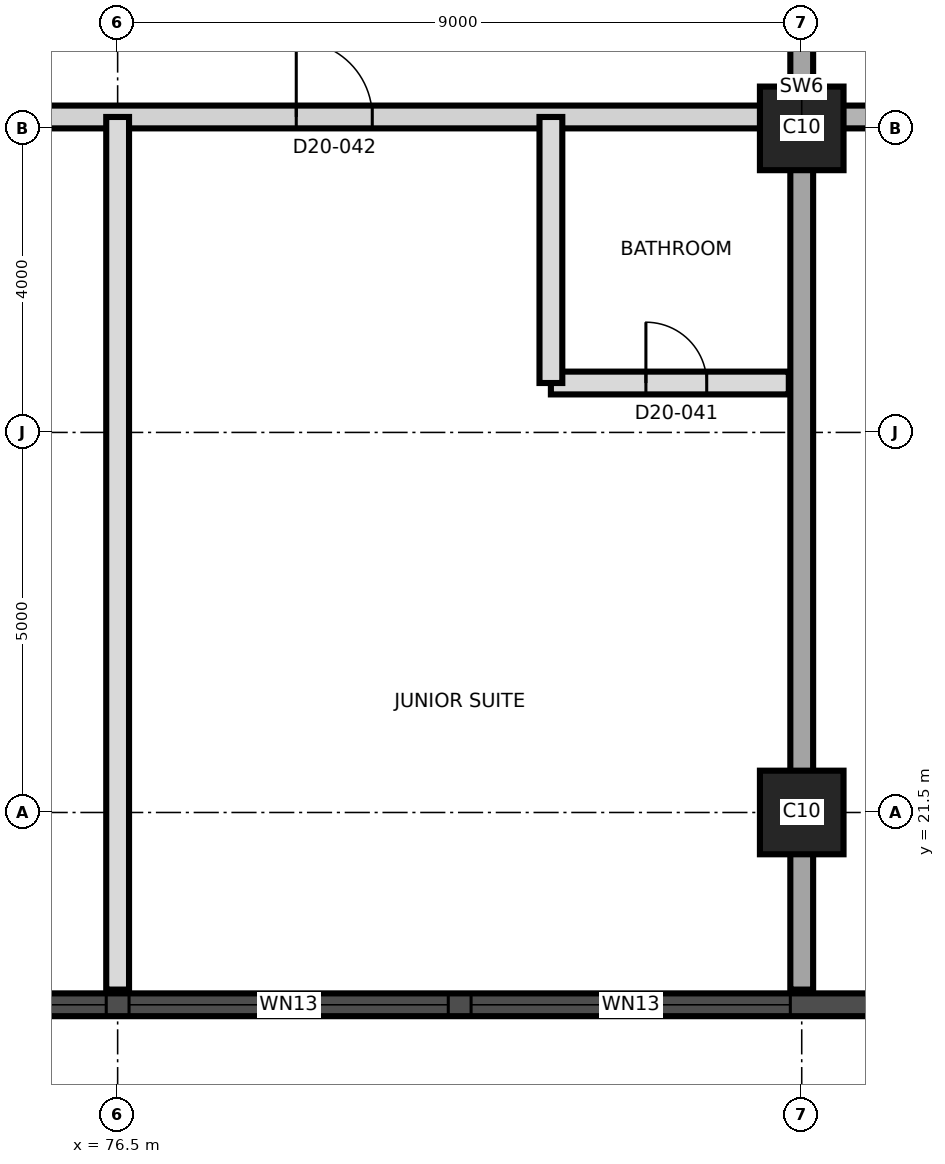
"""IFC4 building model, lengths in metres.
Left out: names, types, materials, properties, quantities, classifications, styles, units other than length and angle.
Written with IfcOpenShell. Run it as: python <this file> out.ifc"""

import sys

from ifc_helpers import new_model, si_unit, direction, frame, frame_2d, origin, origin_2d, place, context, subcontext, project, spatial, rectangle, extrude, element, fill, save


model = new_model("IFC4")
c1 = context("Model", 3, precision=1e-05, world=origin(), true_north=direction((0.0, 1.0)))
c2 = subcontext(c1, "Body", "Model", "MODEL_VIEW")
j1 = project(units=[si_unit("LENGTHUNIT", "METRE"), si_unit("PLANEANGLEUNIT", "RADIAN")], contexts=[c1])
p1 = place(None, origin())
s1 = spatial("IfcSite", under=j1, at=p1, CompositionType="ELEMENT")
p2 = place(p1, origin())
s2 = spatial("IfcBuilding", under=s1, at=p2, CompositionType="ELEMENT")
p3 = place(p2, frame((0.0, 0.0, 182.9)))
s3 = spatial("IfcBuildingStorey", under=s2, at=p3, CompositionType="ELEMENT", Elevation=182.9)
for number, where, z_axis, x_axis in (
    (1, (85.5, 21.5, 0.0), (0.0, 0.0, 1.0), (1.0, 0.0, 0.0)),
    (2, (85.5, 30.5, 0.0), (0.0, 0.0, 1.0), (1.0, 0.0, 0.0)),
):
    element("IfcColumn", number, at=place(p3, frame(where, z_axis=z_axis, x_axis=x_axis)), inside=s3, PredefinedType="COLUMN", context=c2, shape_type="SweptSolid", body=[
        extrude(rectangle(XDim=1.1, YDim=1.1, at=origin_2d()), origin(), (0.0, 0.0, 1.0), 3.7),
    ])
p4 = place(p3, frame((85.5, 19.17, 0.0), z_axis=(0.0, 0.0, 1.0), x_axis=(0.0, 1.0, 0.0)))
e3 = element("IfcWall", 3, at=p4, inside=s3, PredefinedType="SHEAR", context=c2, shape_type="SweptSolid", body=[
    extrude(rectangle(XDim=22.66, YDim=0.3, at=frame_2d((11.33, 0.0))), origin(), (0.0, 0.0, 1.0), 3.7),
])
p5 = place(p4, frame((12.53, 0.0, 0.0)))
e4 = element("IfcOpeningElement", 4, at=p5, cuts=e3, PredefinedType="OPENING", context=c2, shape_type="SweptSolid", body=[
    extrude(rectangle(XDim=1.4, YDim=2.1, at=frame_2d((0.7, 1.05))), frame((0.0, 0.16, 0.0), z_axis=(0.0, -1.0, 0.0), x_axis=(1.0, 0.0, 0.0)), (0.0, 0.0, 1.0), 0.32),
])
p6 = place(p3, frame((44.01, 18.97, 0.0), z_axis=(0.0, 0.0, 1.0), x_axis=(1.0, 0.0, 0.0)))
e5 = element("IfcWall", 5, at=p6, inside=s3, PredefinedType="SOLIDWALL", context=c2, shape_type="SweptSolid", body=[
    extrude(rectangle(XDim=43.478, YDim=0.3, at=frame_2d((21.739, 0.0))), origin(), (0.0, 0.0, 1.0), 3.4),
])
p7 = place(p6, frame((1.845, 0.0, 0.3)))
e6 = element("IfcOpeningElement", 6, at=p7, cuts=e5, PredefinedType="OPENING", context=c2, shape_type="SweptSolid", body=[
    extrude(rectangle(XDim=1.8, YDim=2.4, at=frame_2d((0.9, 1.2))), frame((0.0, 0.16, 0.0), z_axis=(0.0, -1.0, 0.0), x_axis=(1.0, 0.0, 0.0)), (0.0, 0.0, 1.0), 0.32),
])
p8 = place(p6, frame((5.64, 0.0, 0.9)))
e7 = element("IfcOpeningElement", 7, at=p8, cuts=e5, PredefinedType="OPENING", context=c2, shape_type="SweptSolid", body=[
    extrude(rectangle(XDim=4.2, YDim=1.7, at=frame_2d((2.1, 0.85))), frame((0.0, 0.16, 0.0), z_axis=(0.0, -1.0, 0.0), x_axis=(1.0, 0.0, 0.0)), (0.0, 0.0, 1.0), 0.32),
])
p9 = place(p6, frame((10.14, 0.0, 0.9)))
e8 = element("IfcOpeningElement", 8, at=p9, cuts=e5, PredefinedType="OPENING", context=c2, shape_type="SweptSolid", body=[
    extrude(rectangle(XDim=4.2, YDim=1.7, at=frame_2d((2.1, 0.85))), frame((0.0, 0.16, 0.0), z_axis=(0.0, -1.0, 0.0), x_axis=(1.0, 0.0, 0.0)), (0.0, 0.0, 1.0), 0.32),
])
p10 = place(p6, frame((14.64, 0.0, 0.9)))
e9 = element("IfcOpeningElement", 9, at=p10, cuts=e5, PredefinedType="OPENING", context=c2, shape_type="SweptSolid", body=[
    extrude(rectangle(XDim=4.2, YDim=1.7, at=frame_2d((2.1, 0.85))), frame((0.0, 0.16, 0.0), z_axis=(0.0, -1.0, 0.0), x_axis=(1.0, 0.0, 0.0)), (0.0, 0.0, 1.0), 0.32),
])
p11 = place(p6, frame((19.14, 0.0, 0.9)))
e10 = element("IfcOpeningElement", 10, at=p11, cuts=e5, PredefinedType="OPENING", context=c2, shape_type="SweptSolid", body=[
    extrude(rectangle(XDim=4.2, YDim=1.7, at=frame_2d((2.1, 0.85))), frame((0.0, 0.16, 0.0), z_axis=(0.0, -1.0, 0.0), x_axis=(1.0, 0.0, 0.0)), (0.0, 0.0, 1.0), 0.32),
])
p12 = place(p6, frame((23.64, 0.0, 0.9)))
e11 = element("IfcOpeningElement", 11, at=p12, cuts=e5, PredefinedType="OPENING", context=c2, shape_type="SweptSolid", body=[
    extrude(rectangle(XDim=4.2, YDim=1.7, at=frame_2d((2.1, 0.85))), frame((0.0, 0.16, 0.0), z_axis=(0.0, -1.0, 0.0), x_axis=(1.0, 0.0, 0.0)), (0.0, 0.0, 1.0), 0.32),
])
p13 = place(p6, frame((28.14, 0.0, 0.9)))
e12 = element("IfcOpeningElement", 12, at=p13, cuts=e5, PredefinedType="OPENING", context=c2, shape_type="SweptSolid", body=[
    extrude(rectangle(XDim=4.2, YDim=1.7, at=frame_2d((2.1, 0.85))), frame((0.0, 0.16, 0.0), z_axis=(0.0, -1.0, 0.0), x_axis=(1.0, 0.0, 0.0)), (0.0, 0.0, 1.0), 0.32),
])
p14 = place(p6, frame((32.64, 0.0, 0.9)))
e13 = element("IfcOpeningElement", 13, at=p14, cuts=e5, PredefinedType="OPENING", context=c2, shape_type="SweptSolid", body=[
    extrude(rectangle(XDim=4.2, YDim=1.7, at=frame_2d((2.1, 0.85))), frame((0.0, 0.16, 0.0), z_axis=(0.0, -1.0, 0.0), x_axis=(1.0, 0.0, 0.0)), (0.0, 0.0, 1.0), 0.32),
])
p15 = place(p6, frame((37.14, 0.0, 0.9)))
e14 = element("IfcOpeningElement", 14, at=p15, cuts=e5, PredefinedType="OPENING", context=c2, shape_type="SweptSolid", body=[
    extrude(rectangle(XDim=4.2, YDim=1.7, at=frame_2d((2.1, 0.85))), frame((0.0, 0.16, 0.0), z_axis=(0.0, -1.0, 0.0), x_axis=(1.0, 0.0, 0.0)), (0.0, 0.0, 1.0), 0.32),
])
p16 = place(p3, frame((82.2, 27.15, 0.0), z_axis=(0.0, 0.0, 1.0), x_axis=(1.0, 0.0, 0.0)))
e15 = element("IfcWall", 15, at=p16, inside=s3, PredefinedType="PARTITIONING", context=c2, shape_type="SweptSolid", body=[
    extrude(rectangle(XDim=3.13, YDim=0.3, at=frame_2d((1.565, 0.0))), origin(), (0.0, 0.0, 1.0), 3.4),
])
p17 = place(p16, frame((1.25, 0.0, 0.0)))
e16 = element("IfcOpeningElement", 16, at=p17, cuts=e15, PredefinedType="OPENING", context=c2, shape_type="SweptSolid", body=[
    extrude(rectangle(XDim=0.8, YDim=2.1, at=frame_2d((0.4, 1.05))), frame((0.0, 0.16, 0.0), z_axis=(0.0, -1.0, 0.0), x_axis=(1.0, 0.0, 0.0)), (0.0, 0.0, 1.0), 0.32),
])
p18 = place(p3, frame((58.65, 30.65, 0.0), z_axis=(0.0, 0.0, 1.0), x_axis=(1.0, 0.0, 0.0)))
e17 = element("IfcWall", 17, at=p18, inside=s3, PredefinedType="PARTITIONING", context=c2, shape_type="SweptSolid", body=[
    extrude(rectangle(XDim=26.68, YDim=0.3, at=frame_2d((13.34, 0.0))), origin(), (0.0, 0.0, 1.0), 3.4),
])
p19 = place(p18, frame((2.9, 0.0, 0.0)))
e18 = element("IfcOpeningElement", 18, at=p19, cuts=e17, PredefinedType="OPENING", context=c2, shape_type="SweptSolid", body=[
    extrude(rectangle(XDim=1.0, YDim=2.1, at=frame_2d((0.5, 1.05))), frame((0.0, 0.16, 0.0), z_axis=(0.0, -1.0, 0.0), x_axis=(1.0, 0.0, 0.0)), (0.0, 0.0, 1.0), 0.32),
])
p20 = place(p18, frame((5.85, 0.0, 0.0)))
e19 = element("IfcOpeningElement", 19, at=p20, cuts=e17, PredefinedType="OPENING", context=c2, shape_type="SweptSolid", body=[
    extrude(rectangle(XDim=1.4, YDim=2.1, at=frame_2d((0.7, 1.05))), frame((0.0, 0.16, 0.0), z_axis=(0.0, -1.0, 0.0), x_axis=(1.0, 0.0, 0.0)), (0.0, 0.0, 1.0), 0.32),
])
p21 = place(p18, frame((10.0, 0.0, 0.0)))
e20 = element("IfcOpeningElement", 20, at=p21, cuts=e17, PredefinedType="OPENING", context=c2, shape_type="SweptSolid", body=[
    extrude(rectangle(XDim=1.0, YDim=2.1, at=frame_2d((0.5, 1.05))), frame((0.0, 0.16, 0.0), z_axis=(0.0, -1.0, 0.0), x_axis=(1.0, 0.0, 0.0)), (0.0, 0.0, 1.0), 0.32),
])
p22 = place(p18, frame((15.85, 0.0, 0.0)))
e21 = element("IfcOpeningElement", 21, at=p22, cuts=e17, PredefinedType="OPENING", context=c2, shape_type="SweptSolid", body=[
    extrude(rectangle(XDim=1.0, YDim=2.1, at=frame_2d((0.5, 1.05))), frame((0.0, 0.16, 0.0), z_axis=(0.0, -1.0, 0.0), x_axis=(1.0, 0.0, 0.0)), (0.0, 0.0, 1.0), 0.32),
])
p23 = place(p18, frame((20.2, 0.0, 0.0)))
e22 = element("IfcOpeningElement", 22, at=p23, cuts=e17, PredefinedType="OPENING", context=c2, shape_type="SweptSolid", body=[
    extrude(rectangle(XDim=1.0, YDim=2.1, at=frame_2d((0.5, 1.05))), frame((0.0, 0.16, 0.0), z_axis=(0.0, -1.0, 0.0), x_axis=(1.0, 0.0, 0.0)), (0.0, 0.0, 1.0), 0.32),
])
p24 = place(p3, frame((85.67, 30.65, 0.0), z_axis=(0.0, 0.0, 1.0), x_axis=(1.0, 0.0, 0.0)))
e23 = element("IfcWall", 23, at=p24, inside=s3, PredefinedType="SHEAR", context=c2, shape_type="SweptSolid", body=[
    extrude(rectangle(XDim=9.58, YDim=0.3, at=frame_2d((4.79, 0.0))), origin(), (0.0, 0.0, 1.0), 3.4),
])
p25 = place(p24, frame((2.08, 0.0, 0.0)))
e24 = element("IfcOpeningElement", 24, at=p25, cuts=e23, PredefinedType="OPENING", context=c2, shape_type="SweptSolid", body=[
    extrude(rectangle(XDim=1.2, YDim=2.1, at=frame_2d((0.6, 1.05))), frame((0.0, 0.16, 0.0), z_axis=(0.0, -1.0, 0.0), x_axis=(1.0, 0.0, 0.0)), (0.0, 0.0, 1.0), 0.32),
])
p26 = place(p24, frame((5.63, 0.0, 0.0)))
e25 = element("IfcOpeningElement", 25, at=p26, cuts=e23, PredefinedType="OPENING", context=c2, shape_type="SweptSolid", body=[
    extrude(rectangle(XDim=1.0, YDim=2.1, at=frame_2d((0.5, 1.05))), frame((0.0, 0.16, 0.0), z_axis=(0.0, -1.0, 0.0), x_axis=(1.0, 0.0, 0.0)), (0.0, 0.0, 1.0), 0.32),
])
p27 = place(p3, frame((76.5, 19.17, 0.0), z_axis=(0.0, 0.0, 1.0), x_axis=(0.0, 1.0, 0.0)))
e26 = element("IfcWall", 26, at=p27, inside=s3, PredefinedType="PARTITIONING", context=c2, shape_type="SweptSolid", body=[
    extrude(rectangle(XDim=11.48, YDim=0.3, at=frame_2d((5.74, 0.0))), origin(), (0.0, 0.0, 1.0), 3.4),
])
p28 = place(p3, frame((82.2, 27.15, 0.0), z_axis=(0.0, 0.0, 1.0), x_axis=(0.0, 1.0, 0.0)))
e27 = element("IfcWall", 27, at=p28, inside=s3, PredefinedType="PARTITIONING", context=c2, shape_type="SweptSolid", body=[
    extrude(rectangle(XDim=3.5, YDim=0.3, at=frame_2d((1.75, 0.0))), origin(), (0.0, 0.0, 1.0), 3.4),
])
p29 = place(p13, origin())
e28 = element("IfcWindow", 28, at=p29, inside=s3, PartitioningType="SINGLE_PANEL", PredefinedType="WINDOW", context=c2, shape_type="SweptSolid", body=[
    extrude(rectangle(XDim=4.2, YDim=1.7, at=frame_2d((2.1, 0.85))), frame((0.0, 0.03, 0.0), z_axis=(0.0, -1.0, 0.0), x_axis=(1.0, 0.0, 0.0)), (0.0, 0.0, 1.0), 0.06),
])
fill(e12, e28)
p30 = place(p14, origin())
e29 = element("IfcWindow", 29, at=p30, inside=s3, PartitioningType="SINGLE_PANEL", PredefinedType="WINDOW", context=c2, shape_type="SweptSolid", body=[
    extrude(rectangle(XDim=4.2, YDim=1.7, at=frame_2d((2.1, 0.85))), frame((0.0, 0.03, 0.0), z_axis=(0.0, -1.0, 0.0), x_axis=(1.0, 0.0, 0.0)), (0.0, 0.0, 1.0), 0.06),
])
fill(e13, e29)
p31 = place(p15, origin())
e30 = element("IfcWindow", 30, at=p31, inside=s3, PartitioningType="SINGLE_PANEL", PredefinedType="WINDOW", context=c2, shape_type="SweptSolid", body=[
    extrude(rectangle(XDim=4.2, YDim=1.7, at=frame_2d((2.1, 0.85))), frame((0.0, 0.03, 0.0), z_axis=(0.0, -1.0, 0.0), x_axis=(1.0, 0.0, 0.0)), (0.0, 0.0, 1.0), 0.06),
])
fill(e14, e30)
p32 = place(p17, origin())
e31 = element("IfcDoor", 31, at=p32, inside=s3, OperationType="SINGLE_SWING_LEFT", PredefinedType="DOOR", context=c2, shape_type="SweptSolid", body=[
    extrude(rectangle(XDim=0.8, YDim=2.1, at=frame_2d((0.4, 1.05))), frame((0.0, 0.025, 0.0), z_axis=(0.0, -1.0, 0.0), x_axis=(1.0, 0.0, 0.0)), (0.0, 0.0, 1.0), 0.05),
])
fill(e16, e31)
p33 = place(p23, origin())
e32 = element("IfcDoor", 32, at=p33, inside=s3, OperationType="SINGLE_SWING_RIGHT", PredefinedType="DOOR", context=c2, shape_type="SweptSolid", body=[
    extrude(rectangle(XDim=1.0, YDim=2.1, at=frame_2d((0.5, 1.05))), frame((0.0, 0.025, 0.0), z_axis=(0.0, -1.0, 0.0), x_axis=(1.0, 0.0, 0.0)), (0.0, 0.0, 1.0), 0.05),
])
fill(e22, e32)
save(model, sys.argv[1])
